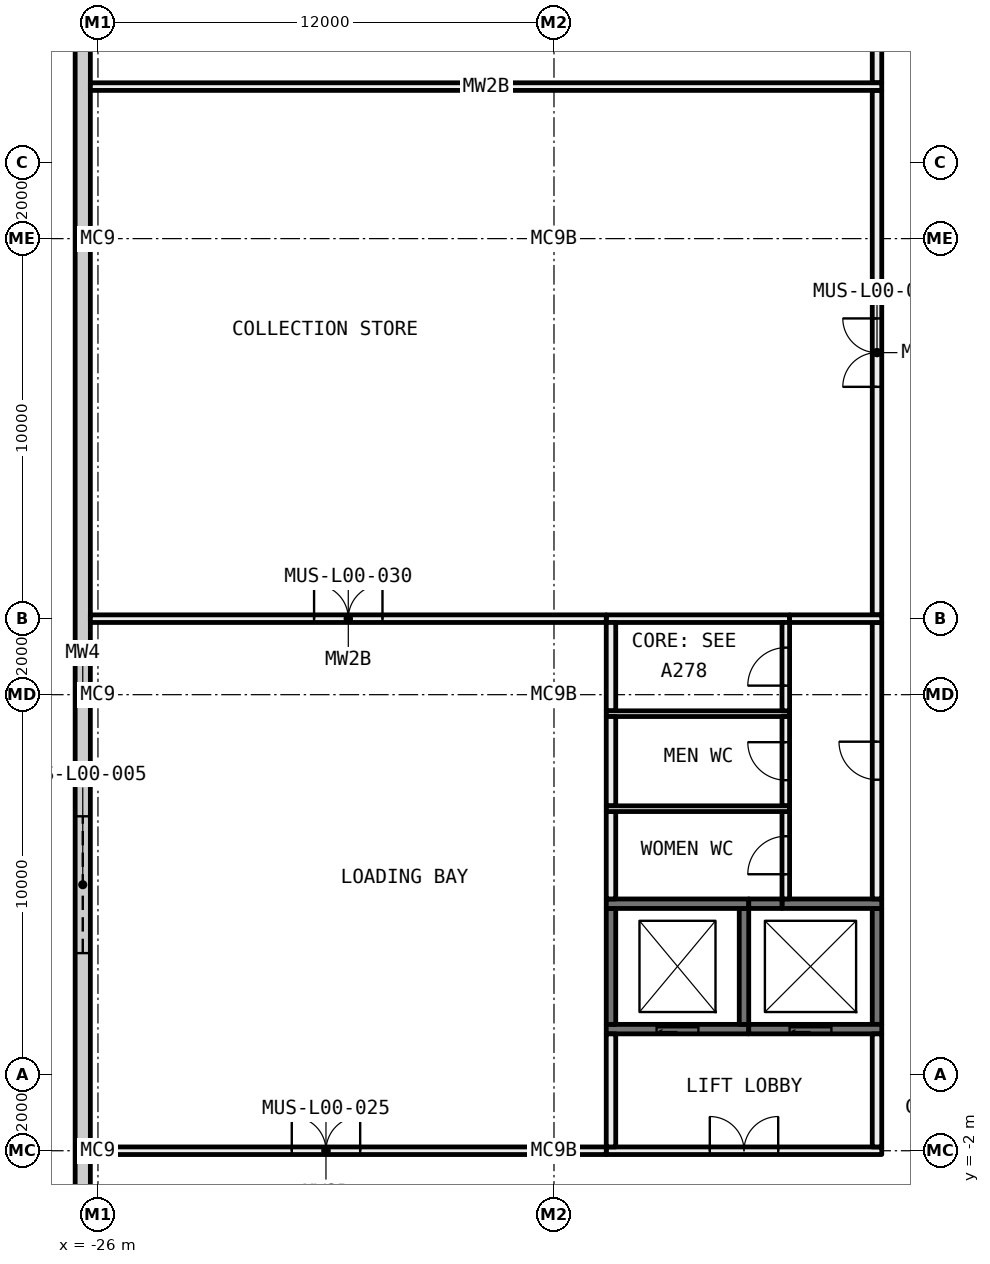
"""IFC4 building model, lengths in metres.
Left out: names, types, materials, properties, quantities, classifications, styles, units other than length and angle.
Written with IfcOpenShell. Run it as: python <this file> out.ifc"""

import sys

from ifc_helpers import new_model, si_unit, direction, frame, frame_2d, origin, origin_2d, place, context, subcontext, project, spatial, rectangle, i_section, extrude, element, fill, save


model = new_model("IFC4")
c1 = context("Model", 3, precision=1e-05, world=origin(), true_north=direction((0.0, 1.0)))
c2 = subcontext(c1, "Body", "Model", "MODEL_VIEW")
j1 = project(units=[si_unit("LENGTHUNIT", "METRE"), si_unit("PLANEANGLEUNIT", "RADIAN")], contexts=[c1])
p1 = place(None, origin())
s1 = spatial("IfcSite", under=j1, at=p1, CompositionType="ELEMENT")
p2 = place(p1, origin())
s2 = spatial("IfcBuilding", under=s1, at=p2, CompositionType="ELEMENT")
p3 = place(p2, origin())
s3 = spatial("IfcBuildingStorey", under=s2, at=p3, CompositionType="ELEMENT", Elevation=0.0)
for number, where, z_axis, x_axis in (
    (1, (-26.0, -2.0, -1.0), (0.0, 0.0, 1.0), (1.0, 0.0, 0.0)),
    (2, (-26.0, 10.0, -1.0), (0.0, 0.0, 1.0), (1.0, 0.0, 0.0)),
    (3, (-26.0, 22.0, -1.0), (0.0, 0.0, 1.0), (1.0, 0.0, 0.0)),
    (4, (-14.0, -2.0, -1.0), (0.0, 0.0, 1.0), (1.0, 0.0, 0.0)),
    (5, (-14.0, 10.0, -1.0), (0.0, 0.0, 1.0), (1.0, 0.0, 0.0)),
    (6, (-14.0, 22.0, -1.0), (0.0, 0.0, 1.0), (1.0, 0.0, 0.0)),
):
    element("IfcColumn", number, at=place(p3, frame(where, z_axis=z_axis, x_axis=x_axis)), inside=s3, PredefinedType="COLUMN", context=c2, shape_type="SweptSolid", body=[
        extrude(i_section(OverallWidth=0.4, OverallDepth=0.4, WebThickness=0.013, FlangeThickness=0.021, FilletRadius=0.022, at=origin_2d()), origin(), (0.0, 0.0, 1.0), 6.6),
    ])
p4 = place(p3, frame((-12.625, 12.0, 0.0), z_axis=(0.0, 0.0, 1.0), x_axis=(1.0, 0.0, 0.0)))
e7 = element("IfcWall", 7, at=p4, inside=s3, PredefinedType="PARTITIONING", context=c2, shape_type="SweptSolid", body=[
    extrude(rectangle(XDim=4.825, YDim=0.2, at=frame_2d((2.413, 0.0))), origin(), (0.0, 0.0, 1.0), 5.6),
])
p5 = place(p3, frame((-12.5, 9.575, 0.0), z_axis=(0.0, 0.0, 1.0), x_axis=(0.0, 1.0, 0.0)))
e8 = element("IfcWall", 8, at=p5, inside=s3, PredefinedType="PARTITIONING", context=c2, shape_type="SweptSolid", body=[
    extrude(rectangle(XDim=2.325, YDim=0.25, at=frame_2d((1.163, 0.0))), origin(), (0.0, 0.0, 1.0), 5.6),
])
p6 = place(p3, frame((-5.5, 12.1, 0.0), z_axis=(0.0, 0.0, 1.0), x_axis=(0.0, 1.0, 0.0)))
e9 = element("IfcWall", 9, at=p6, inside=s3, PredefinedType="PARTITIONING", context=c2, shape_type="SweptSolid", body=[
    extrude(rectangle(XDim=13.8, YDim=0.25, at=frame_2d((6.9, 0.0))), origin(), (0.0, 0.0, 1.0), 5.6),
])
p7 = place(p6, frame((6.0, 0.0, 0.0)))
e10 = element("IfcOpeningElement", 10, at=p7, cuts=e9, PredefinedType="OPENING", context=c2, shape_type="SweptSolid", body=[
    extrude(rectangle(XDim=1.8, YDim=2.1, at=frame_2d((0.9, 1.05))), frame((0.0, 0.135, 0.0), z_axis=(0.0, -1.0, 0.0), x_axis=(1.0, 0.0, 0.0)), (0.0, 0.0, 1.0), 0.27),
])
p8 = place(p3, frame((-5.5, 26.1, 0.0), z_axis=(0.0, 0.0, 1.0), x_axis=(0.0, 1.0, 0.0)))
e11 = element("IfcWall", 11, at=p8, inside=s3, PredefinedType="PARTITIONING", context=c2, shape_type="SweptSolid", body=[
    extrude(rectangle(XDim=16.375, YDim=0.25, at=frame_2d((8.188, 0.0))), origin(), (0.0, 0.0, 1.0), 5.6),
])
p9 = place(p8, frame((7.288, 0.0, 0.0)))
e12 = element("IfcOpeningElement", 12, at=p9, cuts=e11, PredefinedType="OPENING", context=c2, shape_type="SweptSolid", body=[
    extrude(rectangle(XDim=1.8, YDim=2.1, at=frame_2d((0.9, 1.05))), frame((0.0, 0.135, 0.0), z_axis=(0.0, -1.0, 0.0), x_axis=(1.0, 0.0, 0.0)), (0.0, 0.0, 1.0), 0.27),
])
p10 = place(p3, frame((-12.625, -2.0, 0.0), z_axis=(0.0, 0.0, 1.0), x_axis=(1.0, 0.0, 0.0)))
e13 = element("IfcWall", 13, at=p10, inside=s3, PredefinedType="PARTITIONING", context=c2, shape_type="SweptSolid", body=[
    extrude(rectangle(XDim=7.25, YDim=0.2, at=frame_2d((3.625, 0.0))), origin(), (0.0, 0.0, 1.0), 5.012),
])
p11 = place(p10, frame((2.725, 0.0, 0.0)))
e14 = element("IfcOpeningElement", 14, at=p11, cuts=e13, PredefinedType="OPENING", context=c2, shape_type="SweptSolid", body=[
    extrude(rectangle(XDim=1.8, YDim=2.1, at=frame_2d((0.9, 1.05))), frame((0.0, 0.11, 0.0), z_axis=(0.0, -1.0, 0.0), x_axis=(1.0, 0.0, 0.0)), (0.0, 0.0, 1.0), 0.22),
])
p12 = place(p3, frame((-5.5, -1.9, 0.0), z_axis=(0.0, 0.0, 1.0), x_axis=(0.0, 1.0, 0.0)))
e15 = element("IfcWall", 15, at=p12, inside=s3, PredefinedType="PARTITIONING", context=c2, shape_type="SweptSolid", body=[
    extrude(rectangle(XDim=2.975, YDim=0.25, at=frame_2d((1.487, 0.0))), origin(), (0.0, 0.0, 1.0), 5.6),
])
p13 = place(p3, frame((-25.8, -2.0, 0.0), z_axis=(0.0, 0.0, 1.0), x_axis=(1.0, 0.0, 0.0)))
e16 = element("IfcWall", 16, at=p13, inside=s3, PredefinedType="PARTITIONING", context=c2, shape_type="SweptSolid", body=[
    extrude(rectangle(XDim=11.6, YDim=0.2, at=frame_2d((5.8, 0.0))), origin(), (0.0, 0.0, 1.0), 5.012),
])
p14 = place(p13, frame((4.9, 0.0, 0.0)))
e17 = element("IfcOpeningElement", 17, at=p14, cuts=e16, PredefinedType="OPENING", context=c2, shape_type="SweptSolid", body=[
    extrude(rectangle(XDim=1.8, YDim=2.1, at=frame_2d((0.9, 1.05))), frame((0.0, 0.11, 0.0), z_axis=(0.0, -1.0, 0.0), x_axis=(1.0, 0.0, 0.0)), (0.0, 0.0, 1.0), 0.22),
])
p15 = place(p3, frame((-13.8, -2.0, 0.0), z_axis=(0.0, 0.0, 1.0), x_axis=(1.0, 0.0, 0.0)))
e18 = element("IfcWall", 18, at=p15, inside=s3, PredefinedType="PARTITIONING", context=c2, shape_type="SweptSolid", body=[
    extrude(rectangle(XDim=1.175, YDim=0.2, at=frame_2d((0.587, 0.0))), origin(), (0.0, 0.0, 1.0), 5.012),
])
p16 = place(p3, frame((-5.5, 1.325, -1.8), z_axis=(0.0, 0.0, 1.0), x_axis=(0.0, 1.0, 0.0)))
e19 = element("IfcWall", 19, at=p16, inside=s3, PredefinedType="SHEAR", context=c2, shape_type="SweptSolid", body=[
    extrude(rectangle(XDim=3.05, YDim=0.25, at=frame_2d((1.525, 0.0))), origin(), (0.0, 0.0, 1.0), 7.4),
])
p17 = place(p3, frame((-5.5, 4.625, 0.0), z_axis=(0.0, 0.0, 1.0), x_axis=(0.0, 1.0, 0.0)))
e20 = element("IfcWall", 20, at=p17, inside=s3, PredefinedType="PARTITIONING", context=c2, shape_type="SweptSolid", body=[
    extrude(rectangle(XDim=7.275, YDim=0.25, at=frame_2d((3.637, 0.0))), origin(), (0.0, 0.0, 1.0), 5.6),
])
p18 = place(p17, frame((3.138, 0.0, 0.0)))
e21 = element("IfcOpeningElement", 21, at=p18, cuts=e20, PredefinedType="OPENING", context=c2, shape_type="SweptSolid", body=[
    extrude(rectangle(XDim=1.0, YDim=2.1, at=frame_2d((0.5, 1.05))), frame((0.0, 0.135, 0.0), z_axis=(0.0, -1.0, 0.0), x_axis=(1.0, 0.0, 0.0)), (0.0, 0.0, 1.0), 0.27),
])
p19 = place(p3, frame((-26.2, 26.0, 0.0), z_axis=(0.0, 0.0, 1.0), x_axis=(1.0, 0.0, 0.0)))
e22 = element("IfcWall", 22, at=p19, inside=s3, PredefinedType="PARTITIONING", context=c2, shape_type="SweptSolid", body=[
    extrude(rectangle(XDim=20.825, YDim=0.2, at=frame_2d((10.413, 0.0))), origin(), (0.0, 0.0, 1.0), 5.6),
])
p20 = place(p3, frame((-12.5, -1.9, 0.0), z_axis=(0.0, 0.0, 1.0), x_axis=(0.0, 1.0, 0.0)))
e23 = element("IfcWall", 23, at=p20, inside=s3, PredefinedType="PARTITIONING", context=c2, shape_type="SweptSolid", body=[
    extrude(rectangle(XDim=2.975, YDim=0.25, at=frame_2d((1.487, 0.0))), origin(), (0.0, 0.0, 1.0), 5.6),
])
p21 = place(p3, frame((-12.625, 1.2, -1.8), z_axis=(0.0, 0.0, 1.0), x_axis=(1.0, 0.0, 0.0)))
e24 = element("IfcWall", 24, at=p21, inside=s3, PredefinedType="SHEAR", context=c2, shape_type="SweptSolid", body=[
    extrude(rectangle(XDim=3.75, YDim=0.25, at=frame_2d((1.875, 0.0))), origin(), (0.0, 0.0, 1.0), 7.4),
])
p22 = place(p21, frame((1.325, 0.0, 1.8)))
e25 = element("IfcOpeningElement", 25, at=p22, cuts=e24, PredefinedType="OPENING", context=c2, shape_type="SweptSolid", body=[
    extrude(rectangle(XDim=1.1, YDim=2.1, at=frame_2d((0.55, 1.05))), frame((0.0, 0.135, 0.0), z_axis=(0.0, -1.0, 0.0), x_axis=(1.0, 0.0, 0.0)), (0.0, 0.0, 1.0), 0.27),
])
p23 = place(p3, frame((-8.875, 1.2, -1.8), z_axis=(0.0, 0.0, 1.0), x_axis=(1.0, 0.0, 0.0)))
e26 = element("IfcWall", 26, at=p23, inside=s3, PredefinedType="SHEAR", context=c2, shape_type="SweptSolid", body=[
    extrude(rectangle(XDim=3.5, YDim=0.25, at=frame_2d((1.75, 0.0))), origin(), (0.0, 0.0, 1.0), 7.4),
])
p24 = place(p23, frame((1.075, 0.0, 1.8)))
e27 = element("IfcOpeningElement", 27, at=p24, cuts=e26, PredefinedType="OPENING", context=c2, shape_type="SweptSolid", body=[
    extrude(rectangle(XDim=1.1, YDim=2.1, at=frame_2d((0.55, 1.05))), frame((0.0, 0.135, 0.0), z_axis=(0.0, -1.0, 0.0), x_axis=(1.0, 0.0, 0.0)), (0.0, 0.0, 1.0), 0.27),
])
p25 = place(p3, frame((-26.2, 12.0, 0.0), z_axis=(0.0, 0.0, 1.0), x_axis=(1.0, 0.0, 0.0)))
e28 = element("IfcWall", 28, at=p25, inside=s3, PredefinedType="PARTITIONING", context=c2, shape_type="SweptSolid", body=[
    extrude(rectangle(XDim=13.575, YDim=0.2, at=frame_2d((6.788, 0.0))), origin(), (0.0, 0.0, 1.0), 5.6),
])
p26 = place(p25, frame((5.887, 0.0, 0.0)))
e29 = element("IfcOpeningElement", 29, at=p26, cuts=e28, PredefinedType="OPENING", context=c2, shape_type="SweptSolid", body=[
    extrude(rectangle(XDim=1.8, YDim=2.1, at=frame_2d((0.9, 1.05))), frame((0.0, 0.11, 0.0), z_axis=(0.0, -1.0, 0.0), x_axis=(1.0, 0.0, 0.0)), (0.0, 0.0, 1.0), 0.22),
])
p27 = place(p3, frame((-12.625, 9.5, 0.0), z_axis=(0.0, 0.0, 1.0), x_axis=(1.0, 0.0, 0.0)))
e30 = element("IfcWall", 30, at=p27, inside=s3, PredefinedType="PARTITIONING", context=c2, shape_type="SweptSolid", body=[
    extrude(rectangle(XDim=4.825, YDim=0.15, at=frame_2d((2.413, 0.0))), origin(), (0.0, 0.0, 1.0), 5.6),
])
p28 = place(p3, frame((-12.5, 7.075, 0.0), z_axis=(0.0, 0.0, 1.0), x_axis=(0.0, 1.0, 0.0)))
e31 = element("IfcWall", 31, at=p28, inside=s3, PredefinedType="PARTITIONING", context=c2, shape_type="SweptSolid", body=[
    extrude(rectangle(XDim=2.35, YDim=0.25, at=frame_2d((1.175, 0.0))), origin(), (0.0, 0.0, 1.0), 5.6),
])
for number, where, z_axis, x_axis in (
    (32, (-12.5, 1.325, -1.8), (0.0, 0.0, 1.0), (0.0, 1.0, 0.0)),
    (33, (-9.0, 1.325, -1.8), (0.0, 0.0, 1.0), (0.0, 1.0, 0.0)),
):
    element("IfcWall", number, at=place(p3, frame(where, z_axis=z_axis, x_axis=x_axis)), inside=s3, PredefinedType="SHEAR", context=c2, shape_type="SweptSolid", body=[
        extrude(rectangle(XDim=3.05, YDim=0.25, at=frame_2d((1.525, 0.0))), origin(), (0.0, 0.0, 1.0), 7.4),
    ])
p29 = place(p3, frame((-12.625, 4.5, -1.8), z_axis=(0.0, 0.0, 1.0), x_axis=(1.0, 0.0, 0.0)))
e34 = element("IfcWall", 34, at=p29, inside=s3, PredefinedType="SHEAR", context=c2, shape_type="SweptSolid", body=[
    extrude(rectangle(XDim=3.75, YDim=0.25, at=frame_2d((1.875, 0.0))), origin(), (0.0, 0.0, 1.0), 7.4),
])
p30 = place(p3, frame((-8.0, 4.5, -1.8), z_axis=(0.0, 0.0, 1.0), x_axis=(1.0, 0.0, 0.0)))
e35 = element("IfcWall", 35, at=p30, inside=s3, PredefinedType="SHEAR", context=c2, shape_type="SweptSolid", body=[
    extrude(rectangle(XDim=2.625, YDim=0.25, at=frame_2d((1.312, 0.0))), origin(), (0.0, 0.0, 1.0), 7.4),
])
p31 = place(p3, frame((-8.875, 4.5, -1.8), z_axis=(0.0, 0.0, 1.0), x_axis=(1.0, 0.0, 0.0)))
e36 = element("IfcWall", 36, at=p31, inside=s3, PredefinedType="SHEAR", context=c2, shape_type="SweptSolid", body=[
    extrude(rectangle(XDim=0.875, YDim=0.25, at=frame_2d((0.438, 0.0))), origin(), (0.0, 0.0, 1.0), 7.4),
])
p32 = place(p3, frame((-7.9, 9.575, 0.0), z_axis=(0.0, 0.0, 1.0), x_axis=(0.0, 1.0, 0.0)))
e37 = element("IfcWall", 37, at=p32, inside=s3, PredefinedType="PARTITIONING", context=c2, shape_type="SweptSolid", body=[
    extrude(rectangle(XDim=2.325, YDim=0.2, at=frame_2d((1.163, 0.0))), origin(), (0.0, 0.0, 1.0), 5.6),
])
p33 = place(p32, frame((0.663, 0.0, 0.0)))
e38 = element("IfcOpeningElement", 38, at=p33, cuts=e37, PredefinedType="OPENING", context=c2, shape_type="SweptSolid", body=[
    extrude(rectangle(XDim=1.0, YDim=2.1, at=frame_2d((0.5, 1.05))), frame((0.0, 0.11, 0.0), z_axis=(0.0, -1.0, 0.0), x_axis=(1.0, 0.0, 0.0)), (0.0, 0.0, 1.0), 0.22),
])
p34 = place(p3, frame((-7.8, 12.0, 0.0), z_axis=(0.0, 0.0, 1.0), x_axis=(1.0, 0.0, 0.0)))
e39 = element("IfcWall", 39, at=p34, inside=s3, PredefinedType="PARTITIONING", context=c2, shape_type="SweptSolid", body=[
    extrude(rectangle(XDim=2.425, YDim=0.2, at=frame_2d((1.212, 0.0))), origin(), (0.0, 0.0, 1.0), 5.6),
])
p35 = place(p3, frame((-7.9, 7.075, 0.0), z_axis=(0.0, 0.0, 1.0), x_axis=(0.0, 1.0, 0.0)))
e40 = element("IfcWall", 40, at=p35, inside=s3, PredefinedType="PARTITIONING", context=c2, shape_type="SweptSolid", body=[
    extrude(rectangle(XDim=2.35, YDim=0.2, at=frame_2d((1.175, 0.0))), origin(), (0.0, 0.0, 1.0), 5.6),
])
p36 = place(p35, frame((0.675, 0.0, 0.0)))
e41 = element("IfcOpeningElement", 41, at=p36, cuts=e40, PredefinedType="OPENING", context=c2, shape_type="SweptSolid", body=[
    extrude(rectangle(XDim=1.0, YDim=2.1, at=frame_2d((0.5, 1.05))), frame((0.0, 0.11, 0.0), z_axis=(0.0, -1.0, 0.0), x_axis=(1.0, 0.0, 0.0)), (0.0, 0.0, 1.0), 0.22),
])
p37 = place(p3, frame((-7.9, 4.625, 0.0), z_axis=(0.0, 0.0, 1.0), x_axis=(0.0, 1.0, 0.0)))
e42 = element("IfcWall", 42, at=p37, inside=s3, PredefinedType="PARTITIONING", context=c2, shape_type="SweptSolid", body=[
    extrude(rectangle(XDim=2.3, YDim=0.2, at=frame_2d((1.15, 0.0))), origin(), (0.0, 0.0, 1.0), 5.6),
])
p38 = place(p37, frame((0.65, 0.0, 0.0)))
e43 = element("IfcOpeningElement", 43, at=p38, cuts=e42, PredefinedType="OPENING", context=c2, shape_type="SweptSolid", body=[
    extrude(rectangle(XDim=1.0, YDim=2.1, at=frame_2d((0.5, 1.05))), frame((0.0, 0.11, 0.0), z_axis=(0.0, -1.0, 0.0), x_axis=(1.0, 0.0, 0.0)), (0.0, 0.0, 1.0), 0.22),
])
p39 = place(p3, frame((-12.5, 4.625, 0.0), z_axis=(0.0, 0.0, 1.0), x_axis=(0.0, 1.0, 0.0)))
e44 = element("IfcWall", 44, at=p39, inside=s3, PredefinedType="PARTITIONING", context=c2, shape_type="SweptSolid", body=[
    extrude(rectangle(XDim=2.3, YDim=0.25, at=frame_2d((1.15, 0.0))), origin(), (0.0, 0.0, 1.0), 5.6),
])
p40 = place(p3, frame((-12.625, 7.0, 0.0), z_axis=(0.0, 0.0, 1.0), x_axis=(1.0, 0.0, 0.0)))
e45 = element("IfcWall", 45, at=p40, inside=s3, PredefinedType="PARTITIONING", context=c2, shape_type="SweptSolid", body=[
    extrude(rectangle(XDim=4.825, YDim=0.15, at=frame_2d((2.413, 0.0))), origin(), (0.0, 0.0, 1.0), 5.6),
])
p41 = place(p3, frame((-26.4, -26.2, -0.4), z_axis=(0.0, 0.0, 1.0), x_axis=(0.0, 1.0, 0.0)))
e46 = element("IfcWall", 46, at=p41, inside=s3, PredefinedType="STANDARD", context=c2, shape_type="SweptSolid", body=[
    extrude(rectangle(XDim=72.4, YDim=0.4, at=frame_2d((36.2, 0.0))), origin(), (0.0, 0.0, 1.0), 6.0),
])
p42 = place(p41, frame((29.4, 0.0, 0.4)))
e47 = element("IfcOpeningElement", 47, at=p42, cuts=e46, PredefinedType="OPENING", context=c2, shape_type="SweptSolid", body=[
    extrude(rectangle(XDim=3.6, YDim=4.2, at=frame_2d((1.8, 2.1))), frame((0.0, 0.21, 0.0), z_axis=(0.0, -1.0, 0.0), x_axis=(1.0, 0.0, 0.0)), (0.0, 0.0, 1.0), 0.42),
])
p43 = place(p41, frame((2.0, 0.0, 0.4)))
e48 = element("IfcOpeningElement", 48, at=p43, cuts=e46, PredefinedType="OPENING", context=c2, shape_type="SweptSolid", body=[
    extrude(rectangle(XDim=2.4, YDim=2.4, at=frame_2d((1.2, 1.2))), frame((0.0, 0.21, 0.0), z_axis=(0.0, -1.0, 0.0), x_axis=(1.0, 0.0, 0.0)), (0.0, 0.0, 1.0), 0.42),
])
p44 = place(p41, frame((7.5, 0.0, 0.4)))
e49 = element("IfcOpeningElement", 49, at=p44, cuts=e46, PredefinedType="OPENING", context=c2, shape_type="SweptSolid", body=[
    extrude(rectangle(XDim=2.4, YDim=2.4, at=frame_2d((1.2, 1.2))), frame((0.0, 0.21, 0.0), z_axis=(0.0, -1.0, 0.0), x_axis=(1.0, 0.0, 0.0)), (0.0, 0.0, 1.0), 0.42),
])
p45 = place(p42, origin())
e50 = element("IfcDoor", 50, at=p45, inside=s3, OperationType="ROLLINGUP", PredefinedType="GATE", context=c2, shape_type="SweptSolid", body=[
    extrude(rectangle(XDim=3.6, YDim=4.2, at=frame_2d((1.8, 2.1))), frame((0.0, 0.025, 0.0), z_axis=(0.0, -1.0, 0.0), x_axis=(1.0, 0.0, 0.0)), (0.0, 0.0, 1.0), 0.05),
])
fill(e47, e50)
p46 = place(p11, origin())
e51 = element("IfcDoor", 51, at=p46, inside=s3, OperationType="DOUBLE_DOOR_SINGLE_SWING", PredefinedType="DOOR", context=c2, shape_type="SweptSolid", body=[
    extrude(rectangle(XDim=1.8, YDim=2.1, at=frame_2d((0.9, 1.05))), frame((0.0, 0.025, 0.0), z_axis=(0.0, -1.0, 0.0), x_axis=(1.0, 0.0, 0.0)), (0.0, 0.0, 1.0), 0.05),
])
fill(e14, e51)
p47 = place(p22, origin())
e52 = element("IfcDoor", 52, at=p47, inside=s3, OperationType="SLIDING_TO_LEFT", PredefinedType="DOOR", context=c2, shape_type="SweptSolid", body=[
    extrude(rectangle(XDim=1.1, YDim=2.1, at=frame_2d((0.55, 1.05))), frame((0.0, 0.025, 0.0), z_axis=(0.0, -1.0, 0.0), x_axis=(1.0, 0.0, 0.0)), (0.0, 0.0, 1.0), 0.05),
])
fill(e25, e52)
p48 = place(p24, origin())
e53 = element("IfcDoor", 53, at=p48, inside=s3, OperationType="SLIDING_TO_LEFT", PredefinedType="DOOR", context=c2, shape_type="SweptSolid", body=[
    extrude(rectangle(XDim=1.1, YDim=2.1, at=frame_2d((0.55, 1.05))), frame((0.0, 0.025, 0.0), z_axis=(0.0, -1.0, 0.0), x_axis=(1.0, 0.0, 0.0)), (0.0, 0.0, 1.0), 0.05),
])
fill(e27, e53)
p49 = place(p18, origin())
e54 = element("IfcDoor", 54, at=p49, inside=s3, OperationType="SINGLE_SWING_LEFT", PredefinedType="DOOR", context=c2, shape_type="SweptSolid", body=[
    extrude(rectangle(XDim=1.0, YDim=2.1, at=frame_2d((0.5, 1.05))), frame((0.0, 0.025, 0.0), z_axis=(0.0, -1.0, 0.0), x_axis=(1.0, 0.0, 0.0)), (0.0, 0.0, 1.0), 0.05),
])
fill(e21, e54)
p50 = place(p38, origin())
e55 = element("IfcDoor", 55, at=p50, inside=s3, OperationType="SINGLE_SWING_RIGHT", PredefinedType="DOOR", context=c2, shape_type="SweptSolid", body=[
    extrude(rectangle(XDim=1.0, YDim=2.1, at=frame_2d((0.5, 1.05))), frame((0.0, 0.025, 0.0), z_axis=(0.0, -1.0, 0.0), x_axis=(1.0, 0.0, 0.0)), (0.0, 0.0, 1.0), 0.05),
])
fill(e43, e55)
p51 = place(p36, origin())
e56 = element("IfcDoor", 56, at=p51, inside=s3, OperationType="SINGLE_SWING_LEFT", PredefinedType="DOOR", context=c2, shape_type="SweptSolid", body=[
    extrude(rectangle(XDim=1.0, YDim=2.1, at=frame_2d((0.5, 1.05))), frame((0.0, 0.025, 0.0), z_axis=(0.0, -1.0, 0.0), x_axis=(1.0, 0.0, 0.0)), (0.0, 0.0, 1.0), 0.05),
])
fill(e41, e56)
p52 = place(p33, origin())
e57 = element("IfcDoor", 57, at=p52, inside=s3, OperationType="SINGLE_SWING_RIGHT", PredefinedType="DOOR", context=c2, shape_type="SweptSolid", body=[
    extrude(rectangle(XDim=1.0, YDim=2.1, at=frame_2d((0.5, 1.05))), frame((0.0, 0.025, 0.0), z_axis=(0.0, -1.0, 0.0), x_axis=(1.0, 0.0, 0.0)), (0.0, 0.0, 1.0), 0.05),
])
fill(e38, e57)
p53 = place(p14, origin())
e58 = element("IfcDoor", 58, at=p53, inside=s3, OperationType="DOUBLE_DOOR_SINGLE_SWING", PredefinedType="DOOR", context=c2, shape_type="SweptSolid", body=[
    extrude(rectangle(XDim=1.8, YDim=2.1, at=frame_2d((0.9, 1.05))), frame((0.0, 0.025, 0.0), z_axis=(0.0, -1.0, 0.0), x_axis=(1.0, 0.0, 0.0)), (0.0, 0.0, 1.0), 0.05),
])
fill(e17, e58)
p54 = place(p7, origin())
e59 = element("IfcDoor", 59, at=p54, inside=s3, OperationType="DOUBLE_DOOR_SINGLE_SWING", PredefinedType="DOOR", context=c2, shape_type="SweptSolid", body=[
    extrude(rectangle(XDim=1.8, YDim=2.1, at=frame_2d((0.9, 1.05))), frame((0.0, 0.025, 0.0), z_axis=(0.0, -1.0, 0.0), x_axis=(1.0, 0.0, 0.0)), (0.0, 0.0, 1.0), 0.05),
])
fill(e10, e59)
p55 = place(p26, origin())
e60 = element("IfcDoor", 60, at=p55, inside=s3, OperationType="DOUBLE_DOOR_SINGLE_SWING", PredefinedType="DOOR", context=c2, shape_type="SweptSolid", body=[
    extrude(rectangle(XDim=1.8, YDim=2.1, at=frame_2d((0.9, 1.05))), frame((0.0, 0.025, 0.0), z_axis=(0.0, -1.0, 0.0), x_axis=(1.0, 0.0, 0.0)), (0.0, 0.0, 1.0), 0.05),
])
fill(e29, e60)
save(model, sys.argv[1])
